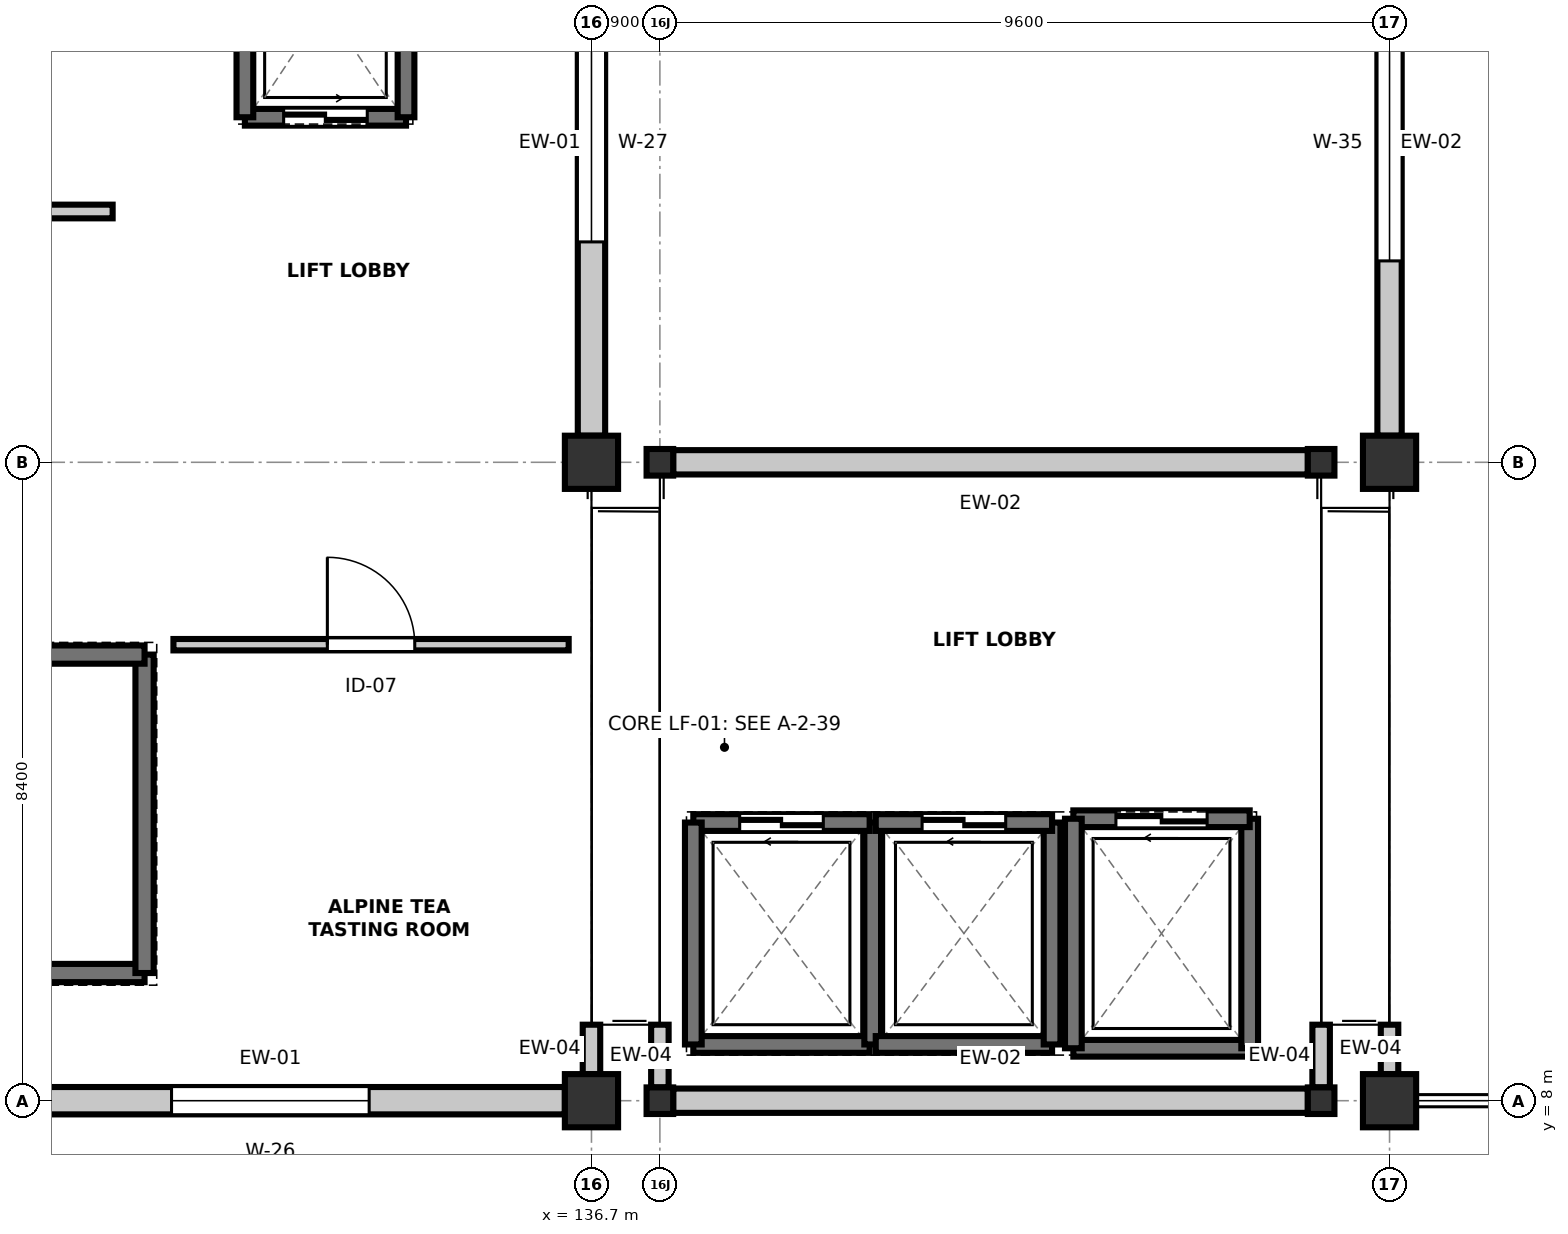
"""IFC4 building model, lengths in metres.
Left out: names, types, materials, properties, quantities, classifications, styles, units other than length and angle.
Written with IfcOpenShell. Run it as: python <this file> out.ifc"""

import sys

from ifc_helpers import new_model, si_unit, direction, frame, frame_2d, origin, origin_2d, place, context, subcontext, project, spatial, rectangle, i_section, extrude, element, fill, save


model = new_model("IFC4")
c1 = context("Model", 3, precision=1e-05, world=origin(), true_north=direction((0.0, 1.0)))
c2 = subcontext(c1, "Body", "Model", "MODEL_VIEW")
j1 = project(units=[si_unit("LENGTHUNIT", "METRE"), si_unit("PLANEANGLEUNIT", "RADIAN")], contexts=[c1])
p1 = place(None, origin())
s1 = spatial("IfcSite", under=j1, at=p1, CompositionType="ELEMENT")
p2 = place(p1, origin())
s2 = spatial("IfcBuilding", under=s1, at=p2, CompositionType="ELEMENT")
p3 = place(p2, frame((0.0, 0.0, 9.6)))
s3 = spatial("IfcBuildingStorey", under=s2, at=p3, CompositionType="ELEMENT", Elevation=9.6)
for number, where, z_axis, x_axis in (
    (1, (136.7, 8.0, 0.0), (0.0, 0.0, 1.0), (1.0, 0.0, 0.0)),
    (2, (136.7, 16.4, 0.0), (0.0, 0.0, 1.0), (1.0, 0.0, 0.0)),
):
    element("IfcColumn", number, at=place(p3, frame(where, z_axis=z_axis, x_axis=x_axis)), inside=s3, PredefinedType="COLUMN", context=c2, shape_type="SweptSolid", body=[
        extrude(rectangle(XDim=0.7, YDim=0.7, at=origin_2d()), origin(), (0.0, 0.0, 1.0), 4.8),
    ])
for number, where, z_axis, x_axis in (
    (3, (137.6, 8.0, 0.0), (0.0, 0.0, 1.0), (1.0, 0.0, 0.0)),
    (4, (137.6, 16.4, 0.0), (0.0, 0.0, 1.0), (1.0, 0.0, 0.0)),
    (5, (146.3, 8.0, 0.0), (0.0, 0.0, 1.0), (1.0, 0.0, 0.0)),
    (6, (146.3, 16.4, 0.0), (0.0, 0.0, 1.0), (1.0, 0.0, 0.0)),
):
    element("IfcColumn", number, at=place(p3, frame(where, z_axis=z_axis, x_axis=x_axis)), inside=s3, PredefinedType="COLUMN", context=c2, shape_type="SweptSolid", body=[
        extrude(i_section(OverallWidth=0.35, OverallDepth=0.35, WebThickness=0.012, FlangeThickness=0.019, FilletRadius=0.02, at=origin_2d()), origin(), (0.0, 0.0, 1.0), 4.8),
    ])
for number, where, z_axis, x_axis in (
    (7, (147.2, 8.0, 0.0), (0.0, 0.0, 1.0), (1.0, 0.0, 0.0)),
    (8, (147.2, 16.4, 0.0), (0.0, 0.0, 1.0), (1.0, 0.0, 0.0)),
):
    element("IfcColumn", number, at=place(p3, frame(where, z_axis=z_axis, x_axis=x_axis)), inside=s3, PredefinedType="COLUMN", context=c2, shape_type="SweptSolid", body=[
        extrude(rectangle(XDim=0.7, YDim=0.7, at=origin_2d()), origin(), (0.0, 0.0, 1.0), 4.8),
    ])
p4 = place(p3, frame((128.6, 8.0, 0.0), z_axis=(0.0, 0.0, 1.0), x_axis=(1.0, 0.0, 0.0)))
e9 = element("IfcWall", 9, at=p4, inside=s3, PredefinedType="STANDARD", context=c2, shape_type="SweptSolid", body=[
    extrude(rectangle(XDim=7.75, YDim=0.36, at=frame_2d((3.875, 0.0))), origin(), (0.0, 0.0, 1.0), 3.755),
])
p5 = place(p4, frame((2.575, 0.0, 0.95)))
e10 = element("IfcOpeningElement", 10, at=p5, cuts=e9, PredefinedType="OPENING", context=c2, shape_type="SweptSolid", body=[
    extrude(rectangle(XDim=2.6, YDim=1.7, at=frame_2d((1.3, 0.85))), frame((0.0, 0.19, 0.0), z_axis=(0.0, -1.0, 0.0), x_axis=(1.0, 0.0, 0.0)), (0.0, 0.0, 1.0), 0.38),
])
p6 = place(p3, frame((136.7, 8.35, 0.0), z_axis=(0.0, 0.0, 1.0), x_axis=(0.0, 1.0, 0.0)))
e11 = element("IfcWall", 11, at=p6, inside=s3, PredefinedType="STANDARD", context=c2, shape_type="SweptSolid", body=[
    extrude(rectangle(XDim=0.65, YDim=0.23, at=frame_2d((0.325, 0.0))), origin(), (0.0, 0.0, 1.0), 3.655),
])
p7 = place(p3, frame((136.7, 16.75, 0.0), z_axis=(0.0, 0.0, 1.0), x_axis=(0.0, 1.0, 0.0)))
e12 = element("IfcWall", 12, at=p7, inside=s3, PredefinedType="STANDARD", context=c2, shape_type="SweptSolid", body=[
    extrude(rectangle(XDim=7.7, YDim=0.36, at=frame_2d((3.85, 0.0))), origin(), (0.0, 0.0, 1.0), 3.655),
])
p8 = place(p7, frame((2.55, 0.0, 0.95)))
e13 = element("IfcOpeningElement", 13, at=p8, cuts=e12, PredefinedType="OPENING", context=c2, shape_type="SweptSolid", body=[
    extrude(rectangle(XDim=2.6, YDim=1.95, at=frame_2d((1.3, 0.975))), frame((0.0, 0.19, 0.0), z_axis=(0.0, -1.0, 0.0), x_axis=(1.0, 0.0, 0.0)), (0.0, 0.0, 1.0), 0.38),
])
p9 = place(p3, frame((137.775, 8.0, 0.0), z_axis=(0.0, 0.0, 1.0), x_axis=(1.0, 0.0, 0.0)))
e14 = element("IfcWall", 14, at=p9, inside=s3, PredefinedType="STANDARD", context=c2, shape_type="SweptSolid", body=[
    extrude(rectangle(XDim=8.35, YDim=0.32, at=frame_2d((4.175, 0.0))), origin(), (0.0, 0.0, 1.0), 3.555),
])
p10 = place(p3, frame((146.3, 8.175, 0.0), z_axis=(0.0, 0.0, 1.0), x_axis=(0.0, 1.0, 0.0)))
e15 = element("IfcWall", 15, at=p10, inside=s3, PredefinedType="STANDARD", context=c2, shape_type="SweptSolid", body=[
    extrude(rectangle(XDim=0.825, YDim=0.23, at=frame_2d((0.413, 0.0))), origin(), (0.0, 0.0, 1.0), 3.555),
])
p11 = place(p3, frame((146.125, 16.4, 0.0), z_axis=(0.0, 0.0, 1.0), x_axis=(-1.0, 0.0, 0.0)))
e16 = element("IfcWall", 16, at=p11, inside=s3, PredefinedType="STANDARD", context=c2, shape_type="SweptSolid", body=[
    extrude(rectangle(XDim=8.35, YDim=0.32, at=frame_2d((4.175, 0.0))), origin(), (0.0, 0.0, 1.0), 3.555),
])
p12 = place(p3, frame((137.6, 8.175, 0.0), z_axis=(0.0, 0.0, 1.0), x_axis=(0.0, 1.0, 0.0)))
e17 = element("IfcWall", 17, at=p12, inside=s3, PredefinedType="STANDARD", context=c2, shape_type="SweptSolid", body=[
    extrude(rectangle(XDim=0.825, YDim=0.23, at=frame_2d((0.413, 0.0))), origin(), (0.0, 0.0, 1.0), 3.555),
])
p13 = place(p3, frame((147.2, 8.35, 0.0), z_axis=(0.0, 0.0, 1.0), x_axis=(0.0, 1.0, 0.0)))
e18 = element("IfcWall", 18, at=p13, inside=s3, PredefinedType="STANDARD", context=c2, shape_type="SweptSolid", body=[
    extrude(rectangle(XDim=0.65, YDim=0.23, at=frame_2d((0.325, 0.0))), origin(), (0.0, 0.0, 1.0), 4.115),
])
p14 = place(p3, frame((147.2, 24.45, 0.0), z_axis=(0.0, 0.0, 1.0), x_axis=(0.0, -1.0, 0.0)))
e19 = element("IfcWall", 19, at=p14, inside=s3, PredefinedType="STANDARD", context=c2, shape_type="SweptSolid", body=[
    extrude(rectangle(XDim=7.7, YDim=0.32, at=frame_2d((3.85, 0.0))), origin(), (0.0, 0.0, 1.0), 4.115),
])
p15 = place(p14, frame((2.3, 0.0, 0.95)))
e20 = element("IfcOpeningElement", 20, at=p15, cuts=e19, PredefinedType="OPENING", context=c2, shape_type="SweptSolid", body=[
    extrude(rectangle(XDim=3.1, YDim=1.95, at=frame_2d((1.55, 0.975))), frame((0.0, 0.17, 0.0), z_axis=(0.0, -1.0, 0.0), x_axis=(1.0, 0.0, 0.0)), (0.0, 0.0, 1.0), 0.34),
])
p16 = place(p3, frame((122.28, 9.68, 0.0), z_axis=(0.0, 0.0, 1.0), x_axis=(1.0, 0.0, 0.0)))
e21 = element("IfcWall", 21, at=p16, inside=s3, PredefinedType="SHEAR", context=c2, shape_type="SweptSolid", body=[
    extrude(rectangle(XDim=8.54, YDim=0.24, at=frame_2d((4.27, 0.0))), origin(), (0.0, 0.0, 1.0), 4.52),
])
p17 = place(p3, frame((130.82, 9.68, 0.0), z_axis=(0.0, 0.0, 1.0), x_axis=(0.0, 1.0, 0.0)))
e22 = element("IfcWall", 22, at=p17, inside=s3, PredefinedType="SHEAR", context=c2, shape_type="SweptSolid", body=[
    extrude(rectangle(XDim=4.19, YDim=0.24, at=frame_2d((2.095, 0.0))), origin(), (0.0, 0.0, 1.0), 4.52),
])
p18 = place(p3, frame((130.82, 13.87, 0.0), z_axis=(0.0, 0.0, 1.0), x_axis=(-1.0, 0.0, 0.0)))
e23 = element("IfcWall", 23, at=p18, inside=s3, PredefinedType="SHEAR", context=c2, shape_type="SweptSolid", body=[
    extrude(rectangle(XDim=8.54, YDim=0.24, at=frame_2d((4.27, 0.0))), origin(), (0.0, 0.0, 1.0), 4.52),
])
p19 = place(p3, frame((138.04, 8.74, 0.0), z_axis=(0.0, 0.0, 1.0), x_axis=(1.0, 0.0, 0.0)))
e24 = element("IfcWall", 24, at=p19, inside=s3, PredefinedType="SHEAR", context=c2, shape_type="SweptSolid", body=[
    extrude(rectangle(XDim=2.32, YDim=0.22, at=frame_2d((1.16, 0.0))), origin(), (0.0, 0.0, 1.0), 4.52),
])
p20 = place(p3, frame((140.4, 8.74, 0.0), z_axis=(0.0, 0.0, 1.0), x_axis=(0.0, 1.0, 0.0)))
e25 = element("IfcWall", 25, at=p20, inside=s3, PredefinedType="SHEAR", context=c2, shape_type="SweptSolid", body=[
    extrude(rectangle(XDim=2.92, YDim=0.22, at=frame_2d((1.46, 0.0))), origin(), (0.0, 0.0, 1.0), 4.52),
])
p21 = place(p3, frame((140.36, 11.66, 0.0), z_axis=(0.0, 0.0, 1.0), x_axis=(-1.0, 0.0, 0.0)))
e26 = element("IfcWall", 26, at=p21, inside=s3, PredefinedType="SHEAR", context=c2, shape_type="SweptSolid", body=[
    extrude(rectangle(XDim=2.32, YDim=0.22, at=frame_2d((1.16, 0.0))), origin(), (0.0, 0.0, 1.0), 4.52),
])
p22 = place(p21, frame((0.61, 0.0, 0.0)))
e27 = element("IfcOpeningElement", 27, at=p22, cuts=e26, PredefinedType="OPENING", context=c2, shape_type="SweptSolid", body=[
    extrude(rectangle(XDim=1.1, YDim=2.15, at=frame_2d((0.55, 1.075))), frame((0.0, 0.12, 0.0), z_axis=(0.0, -1.0, 0.0), x_axis=(1.0, 0.0, 0.0)), (0.0, 0.0, 1.0), 0.24),
])
p23 = place(p3, frame((138.04, 11.66, 0.0), z_axis=(0.0, 0.0, 1.0), x_axis=(0.0, -1.0, 0.0)))
e28 = element("IfcWall", 28, at=p23, inside=s3, PredefinedType="SHEAR", context=c2, shape_type="SweptSolid", body=[
    extrude(rectangle(XDim=2.92, YDim=0.22, at=frame_2d((1.46, 0.0))), origin(), (0.0, 0.0, 1.0), 4.52),
])
p24 = place(p3, frame((140.44, 8.74, 0.0), z_axis=(0.0, 0.0, 1.0), x_axis=(1.0, 0.0, 0.0)))
e29 = element("IfcWall", 29, at=p24, inside=s3, PredefinedType="SHEAR", context=c2, shape_type="SweptSolid", body=[
    extrude(rectangle(XDim=2.32, YDim=0.22, at=frame_2d((1.16, 0.0))), origin(), (0.0, 0.0, 1.0), 4.52),
])
p25 = place(p3, frame((142.76, 8.74, 0.0), z_axis=(0.0, 0.0, 1.0), x_axis=(0.0, 1.0, 0.0)))
e30 = element("IfcWall", 30, at=p25, inside=s3, PredefinedType="SHEAR", context=c2, shape_type="SweptSolid", body=[
    extrude(rectangle(XDim=2.92, YDim=0.22, at=frame_2d((1.46, 0.0))), origin(), (0.0, 0.0, 1.0), 4.52),
])
p26 = place(p3, frame((142.76, 11.66, 0.0), z_axis=(0.0, 0.0, 1.0), x_axis=(-1.0, 0.0, 0.0)))
e31 = element("IfcWall", 31, at=p26, inside=s3, PredefinedType="SHEAR", context=c2, shape_type="SweptSolid", body=[
    extrude(rectangle(XDim=2.32, YDim=0.22, at=frame_2d((1.16, 0.0))), origin(), (0.0, 0.0, 1.0), 4.52),
])
p27 = place(p26, frame((0.61, 0.0, 0.0)))
e32 = element("IfcOpeningElement", 32, at=p27, cuts=e31, PredefinedType="OPENING", context=c2, shape_type="SweptSolid", body=[
    extrude(rectangle(XDim=1.1, YDim=2.15, at=frame_2d((0.55, 1.075))), frame((0.0, 0.12, 0.0), z_axis=(0.0, -1.0, 0.0), x_axis=(1.0, 0.0, 0.0)), (0.0, 0.0, 1.0), 0.24),
])
p28 = place(p3, frame((132.14, 20.94, 0.0), z_axis=(0.0, 0.0, 1.0), x_axis=(1.0, 0.0, 0.0)))
e33 = element("IfcWall", 33, at=p28, inside=s3, PredefinedType="SHEAR", context=c2, shape_type="SweptSolid", body=[
    extrude(rectangle(XDim=2.12, YDim=0.22, at=frame_2d((1.06, 0.0))), origin(), (0.0, 0.0, 1.0), 4.52),
])
p29 = place(p28, frame((0.51, 0.0, 0.0)))
e34 = element("IfcOpeningElement", 34, at=p29, cuts=e33, PredefinedType="OPENING", context=c2, shape_type="SweptSolid", body=[
    extrude(rectangle(XDim=1.1, YDim=2.15, at=frame_2d((0.55, 1.075))), frame((0.0, 0.12, 0.0), z_axis=(0.0, -1.0, 0.0), x_axis=(1.0, 0.0, 0.0)), (0.0, 0.0, 1.0), 0.24),
])
for number, where, z_axis, x_axis in (
    (35, (134.26, 20.94, 0.0), (0.0, 0.0, 1.0), (0.0, 1.0, 0.0)),
    (36, (132.14, 23.86, 0.0), (0.0, 0.0, 1.0), (0.0, -1.0, 0.0)),
):
    element("IfcWall", number, at=place(p3, frame(where, z_axis=z_axis, x_axis=x_axis)), inside=s3, PredefinedType="SHEAR", context=c2, shape_type="SweptSolid", body=[
        extrude(rectangle(XDim=2.92, YDim=0.22, at=frame_2d((1.46, 0.0))), origin(), (0.0, 0.0, 1.0), 4.52),
    ])
p30 = place(p3, frame((143.04, 8.69, 0.0), z_axis=(0.0, 0.0, 1.0), x_axis=(1.0, 0.0, 0.0)))
e37 = element("IfcWall", 37, at=p30, inside=s3, PredefinedType="SHEAR", context=c2, shape_type="SweptSolid", body=[
    extrude(rectangle(XDim=2.32, YDim=0.22, at=frame_2d((1.16, 0.0))), origin(), (0.0, 0.0, 1.0), 4.52),
])
p31 = place(p3, frame((145.36, 8.69, 0.0), z_axis=(0.0, 0.0, 1.0), x_axis=(0.0, 1.0, 0.0)))
e38 = element("IfcWall", 38, at=p31, inside=s3, PredefinedType="SHEAR", context=c2, shape_type="SweptSolid", body=[
    extrude(rectangle(XDim=3.02, YDim=0.22, at=frame_2d((1.51, 0.0))), origin(), (0.0, 0.0, 1.0), 4.52),
])
p32 = place(p3, frame((145.36, 11.71, 0.0), z_axis=(0.0, 0.0, 1.0), x_axis=(-1.0, 0.0, 0.0)))
e39 = element("IfcWall", 39, at=p32, inside=s3, PredefinedType="SHEAR", context=c2, shape_type="SweptSolid", body=[
    extrude(rectangle(XDim=2.32, YDim=0.22, at=frame_2d((1.16, 0.0))), origin(), (0.0, 0.0, 1.0), 4.52),
])
p33 = place(p32, frame((0.56, 0.0, 0.0)))
e40 = element("IfcOpeningElement", 40, at=p33, cuts=e39, PredefinedType="OPENING", context=c2, shape_type="SweptSolid", body=[
    extrude(rectangle(XDim=1.2, YDim=2.15, at=frame_2d((0.6, 1.075))), frame((0.0, 0.12, 0.0), z_axis=(0.0, -1.0, 0.0), x_axis=(1.0, 0.0, 0.0)), (0.0, 0.0, 1.0), 0.24),
])
p34 = place(p3, frame((143.04, 11.71, 0.0), z_axis=(0.0, 0.0, 1.0), x_axis=(0.0, -1.0, 0.0)))
e41 = element("IfcWall", 41, at=p34, inside=s3, PredefinedType="SHEAR", context=c2, shape_type="SweptSolid", body=[
    extrude(rectangle(XDim=3.02, YDim=0.22, at=frame_2d((1.51, 0.0))), origin(), (0.0, 0.0, 1.0), 4.52),
])
p35 = place(p3, frame((120.8, 19.7, 0.0), z_axis=(0.0, 0.0, 1.0), x_axis=(1.0, 0.0, 0.0)))
e42 = element("IfcWall", 42, at=p35, inside=s3, PredefinedType="PARTITIONING", context=c2, shape_type="SweptSolid", body=[
    extrude(rectangle(XDim=9.6, YDim=0.18, at=frame_2d((4.8, 0.0))), origin(), (0.0, 0.0, 1.0), 3.655),
])
p36 = place(p35, frame((2.75, 0.0, 0.0)))
e43 = element("IfcOpeningElement", 43, at=p36, cuts=e42, PredefinedType="OPENING", context=c2, shape_type="SweptSolid", body=[
    extrude(rectangle(XDim=1.3, YDim=2.2, at=frame_2d((0.65, 1.1))), frame((0.0, 0.1, 0.0), z_axis=(0.0, -1.0, 0.0), x_axis=(1.0, 0.0, 0.0)), (0.0, 0.0, 1.0), 0.2),
])
p37 = place(p3, frame((131.2, 14.0, 0.0), z_axis=(0.0, 0.0, 1.0), x_axis=(1.0, 0.0, 0.0)))
e44 = element("IfcWall", 44, at=p37, inside=s3, PredefinedType="PARTITIONING", context=c2, shape_type="SweptSolid", body=[
    extrude(rectangle(XDim=5.2, YDim=0.15, at=frame_2d((2.6, 0.0))), origin(), (0.0, 0.0, 1.0), 3.655),
])
p38 = place(p37, frame((2.025, 0.0, 0.0)))
e45 = element("IfcOpeningElement", 45, at=p38, cuts=e44, PredefinedType="OPENING", context=c2, shape_type="SweptSolid", body=[
    extrude(rectangle(XDim=1.15, YDim=2.15, at=frame_2d((0.575, 1.075))), frame((0.0, 0.085, 0.0), z_axis=(0.0, -1.0, 0.0), x_axis=(1.0, 0.0, 0.0)), (0.0, 0.0, 1.0), 0.17),
])
p39 = place(p5, origin())
e46 = element("IfcWindow", 46, at=p39, inside=s3, PartitioningType="SINGLE_PANEL", PredefinedType="WINDOW", context=c2, shape_type="SweptSolid", body=[
    extrude(rectangle(XDim=2.6, YDim=1.7, at=frame_2d((1.3, 0.85))), frame((0.0, 0.03, 0.0), z_axis=(0.0, -1.0, 0.0), x_axis=(1.0, 0.0, 0.0)), (0.0, 0.0, 1.0), 0.06),
])
fill(e10, e46)
p40 = place(p8, origin())
e47 = element("IfcWindow", 47, at=p40, inside=s3, PartitioningType="SINGLE_PANEL", PredefinedType="WINDOW", context=c2, shape_type="SweptSolid", body=[
    extrude(rectangle(XDim=2.6, YDim=1.95, at=frame_2d((1.3, 0.975))), frame((0.0, 0.03, 0.0), z_axis=(0.0, -1.0, 0.0), x_axis=(1.0, 0.0, 0.0)), (0.0, 0.0, 1.0), 0.06),
])
fill(e13, e47)
p41 = place(p15, origin())
e48 = element("IfcWindow", 48, at=p41, inside=s3, PartitioningType="SINGLE_PANEL", PredefinedType="WINDOW", context=c2, shape_type="SweptSolid", body=[
    extrude(rectangle(XDim=3.1, YDim=1.95, at=frame_2d((1.55, 0.975))), frame((0.0, 0.03, 0.0), z_axis=(0.0, -1.0, 0.0), x_axis=(1.0, 0.0, 0.0)), (0.0, 0.0, 1.0), 0.06),
])
fill(e20, e48)
p42 = place(p22, origin())
e49 = element("IfcDoor", 49, at=p42, inside=s3, OperationType="DOUBLE_DOOR_SLIDING", PredefinedType="DOOR", context=c2, shape_type="SweptSolid", body=[
    extrude(rectangle(XDim=1.1, YDim=2.15, at=frame_2d((0.55, 1.075))), frame((0.0, 0.025, 0.0), z_axis=(0.0, -1.0, 0.0), x_axis=(1.0, 0.0, 0.0)), (0.0, 0.0, 1.0), 0.05),
])
fill(e27, e49)
p43 = place(p27, origin())
e50 = element("IfcDoor", 50, at=p43, inside=s3, OperationType="DOUBLE_DOOR_SLIDING", PredefinedType="DOOR", context=c2, shape_type="SweptSolid", body=[
    extrude(rectangle(XDim=1.1, YDim=2.15, at=frame_2d((0.55, 1.075))), frame((0.0, 0.025, 0.0), z_axis=(0.0, -1.0, 0.0), x_axis=(1.0, 0.0, 0.0)), (0.0, 0.0, 1.0), 0.05),
])
fill(e32, e50)
p44 = place(p29, origin())
e51 = element("IfcDoor", 51, at=p44, inside=s3, OperationType="DOUBLE_DOOR_SLIDING", PredefinedType="DOOR", context=c2, shape_type="SweptSolid", body=[
    extrude(rectangle(XDim=1.1, YDim=2.15, at=frame_2d((0.55, 1.075))), frame((0.0, 0.025, 0.0), z_axis=(0.0, -1.0, 0.0), x_axis=(1.0, 0.0, 0.0)), (0.0, 0.0, 1.0), 0.05),
])
fill(e34, e51)
p45 = place(p33, origin())
e52 = element("IfcDoor", 52, at=p45, inside=s3, OperationType="DOUBLE_DOOR_SLIDING", PredefinedType="DOOR", context=c2, shape_type="SweptSolid", body=[
    extrude(rectangle(XDim=1.2, YDim=2.15, at=frame_2d((0.6, 1.075))), frame((0.0, 0.025, 0.0), z_axis=(0.0, -1.0, 0.0), x_axis=(1.0, 0.0, 0.0)), (0.0, 0.0, 1.0), 0.05),
])
fill(e40, e52)
p46 = place(p38, origin())
e53 = element("IfcDoor", 53, at=p46, inside=s3, OperationType="SINGLE_SWING_LEFT", PredefinedType="DOOR", context=c2, shape_type="SweptSolid", body=[
    extrude(rectangle(XDim=1.15, YDim=2.15, at=frame_2d((0.575, 1.075))), frame((0.0, 0.025, 0.0), z_axis=(0.0, -1.0, 0.0), x_axis=(1.0, 0.0, 0.0)), (0.0, 0.0, 1.0), 0.05),
])
fill(e45, e53)
save(model, sys.argv[1])
